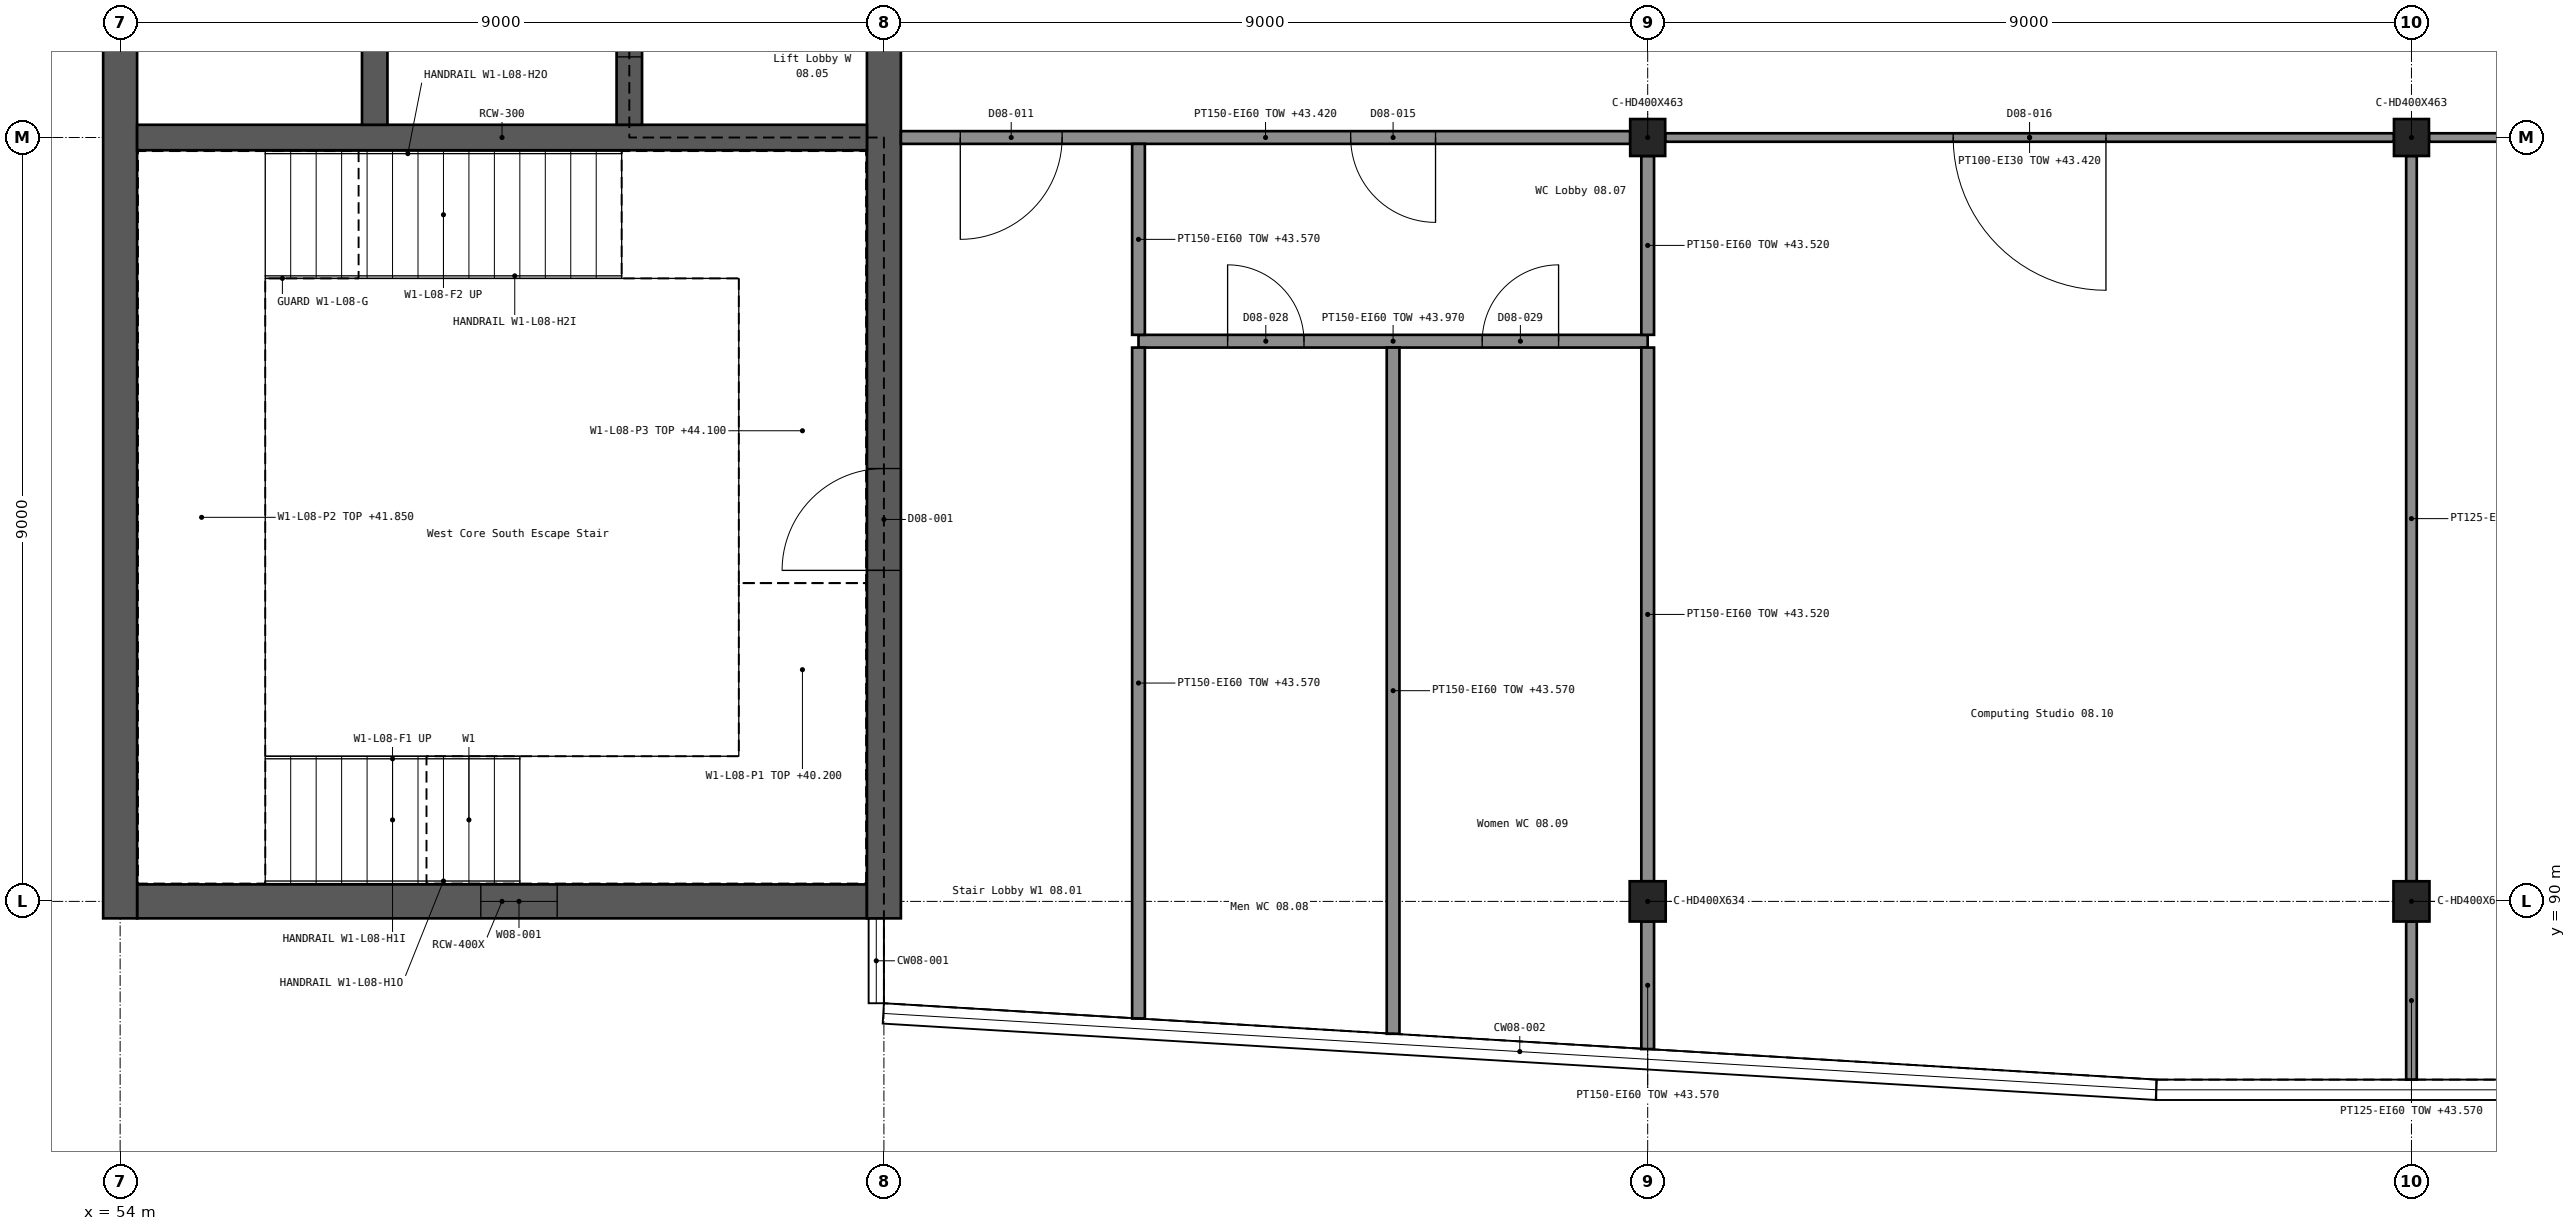
"""IFC4 building model, lengths in metres.
Left out: names, types, materials, properties, quantities, classifications, styles, units other than length and angle.
Written with IfcOpenShell. Run it as: python <this file> out.ifc"""

import sys

from ifc_helpers import new_model, si_unit, direction, frame, frame_2d, origin, origin_2d, place, context, subcontext, project, spatial, rectangle, i_section, extrude, element, fill, save


model = new_model("IFC4")
c1 = context("Model", 3, precision=1e-05, world=origin(), true_north=direction((0.0, 1.0)))
c2 = subcontext(c1, "Body", "Model", "MODEL_VIEW")
j1 = project(units=[si_unit("LENGTHUNIT", "METRE"), si_unit("PLANEANGLEUNIT", "RADIAN")], contexts=[c1])
p1 = place(None, origin())
s1 = spatial("IfcSite", under=j1, at=p1, CompositionType="ELEMENT")
p2 = place(p1, origin())
s2 = spatial("IfcBuilding", under=s1, at=p2, CompositionType="ELEMENT")
p3 = place(p2, frame((0.0, 0.0, 40.2)))
s3 = spatial("IfcBuildingStorey", under=s2, at=p3, CompositionType="ELEMENT", Elevation=40.2)
p4 = place(p3, frame((54.2, 90.0, 0.0), z_axis=(0.0, 0.0, 1.0), x_axis=(1.0, 0.0, 0.0)))
e1 = element("IfcWall", 1, at=p4, inside=s3, PredefinedType="SHEAR", context=c2, shape_type="SweptSolid", body=[
    extrude(rectangle(XDim=8.6, YDim=0.4, at=frame_2d((4.3, 0.0))), origin(), (0.0, 0.0, 1.0), 3.9),
])
p5 = place(p4, frame((4.05, 0.0, 1.2)))
e2 = element("IfcOpeningElement", 2, at=p5, cuts=e1, PredefinedType="OPENING", context=c2, shape_type="SweptSolid", body=[
    extrude(rectangle(XDim=0.9, YDim=1.5, at=frame_2d((0.45, 0.75))), frame((0.0, 0.211, 0.0), z_axis=(0.0, -1.0, 0.0), x_axis=(1.0, 0.0, 0.0)), (0.0, 0.0, 1.0), 0.422),
])
p6 = place(p3, frame((54.0, 89.8, 0.0), z_axis=(0.0, 0.0, 1.0), x_axis=(0.0, 1.0, 0.0)))
e3 = element("IfcWall", 3, at=p6, inside=s3, PredefinedType="SHEAR", context=c2, shape_type="SweptSolid", body=[
    extrude(rectangle(XDim=27.4, YDim=0.4, at=frame_2d((13.7, 0.0))), origin(), (0.0, 0.0, 1.0), 3.9),
])
p7 = place(p3, frame((63.0, 89.8, 0.0), z_axis=(0.0, 0.0, 1.0), x_axis=(0.0, 1.0, 0.0)))
e4 = element("IfcWall", 4, at=p7, inside=s3, PredefinedType="SHEAR", context=c2, shape_type="SweptSolid", body=[
    extrude(rectangle(XDim=27.4, YDim=0.4, at=frame_2d((13.7, 0.0))), origin(), (0.0, 0.0, 1.0), 3.9),
])
p8 = place(p7, frame((4.1, 0.0, 0.0)))
e5 = element("IfcOpeningElement", 5, at=p8, cuts=e4, PredefinedType="OPENING", context=c2, shape_type="SweptSolid", body=[
    extrude(rectangle(XDim=1.2, YDim=2.1, at=frame_2d((0.6, 1.05))), frame((0.0, 0.211, 0.0), z_axis=(0.0, -1.0, 0.0), x_axis=(1.0, 0.0, 0.0)), (0.0, 0.0, 1.0), 0.422),
])
p9 = place(p7, frame((22.1, 0.0, 0.0)))
e6 = element("IfcOpeningElement", 6, at=p9, cuts=e4, PredefinedType="OPENING", context=c2, shape_type="SweptSolid", body=[
    extrude(rectangle(XDim=1.2, YDim=2.1, at=frame_2d((0.6, 1.05))), frame((0.0, 0.211, 0.0), z_axis=(0.0, -1.0, 0.0), x_axis=(1.0, 0.0, 0.0)), (0.0, 0.0, 1.0), 0.422),
])
p10 = place(p7, frame((12.5, 0.0, 0.0)))
e7 = element("IfcOpeningElement", 7, at=p10, cuts=e4, PredefinedType="OPENING", context=c2, shape_type="SweptSolid", body=[
    extrude(rectangle(XDim=2.0, YDim=2.1, at=frame_2d((1.0, 1.05))), frame((0.0, 0.211, 0.0), z_axis=(0.0, -1.0, 0.0), x_axis=(1.0, 0.0, 0.0)), (0.0, 0.0, 1.0), 0.422),
])
p11 = place(p3, frame((54.2, 99.0, 0.0), z_axis=(0.0, 0.0, 1.0), x_axis=(1.0, 0.0, 0.0)))
e8 = element("IfcWall", 8, at=p11, inside=s3, PredefinedType="SHEAR", context=c2, shape_type="SweptSolid", body=[
    extrude(rectangle(XDim=8.6, YDim=0.3, at=frame_2d((4.3, 0.0))), origin(), (0.0, 0.0, 1.0), 3.9),
])
p12 = place(p3, frame((57.0, 99.15, 0.0), z_axis=(0.0, 0.0, 1.0), x_axis=(0.0, 1.0, 0.0)))
e9 = element("IfcWall", 9, at=p12, inside=s3, PredefinedType="SHEAR", context=c2, shape_type="SweptSolid", body=[
    extrude(rectangle(XDim=8.7, YDim=0.3, at=frame_2d((4.35, 0.0))), origin(), (0.0, 0.0, 1.0), 3.9),
])
p13 = place(p3, frame((60.0, 99.15, 0.0), z_axis=(0.0, 0.0, 1.0), x_axis=(0.0, 1.0, 0.0)))
e10 = element("IfcWall", 10, at=p13, inside=s3, PredefinedType="SHEAR", context=c2, shape_type="SweptSolid", body=[
    extrude(rectangle(XDim=8.7, YDim=0.3, at=frame_2d((4.35, 0.0))), origin(), (0.0, 0.0, 1.0), 3.9),
])
p14 = place(p13, frame((0.8, 0.0, 0.0)))
e11 = element("IfcOpeningElement", 11, at=p14, cuts=e10, PredefinedType="OPENING", context=c2, shape_type="SweptSolid", body=[
    extrude(rectangle(XDim=1.1, YDim=2.1, at=frame_2d((0.55, 1.05))), frame((0.0, 0.161, 0.0), z_axis=(0.0, -1.0, 0.0), x_axis=(1.0, 0.0, 0.0)), (0.0, 0.0, 1.0), 0.322),
])
p15 = place(p13, frame((3.8, 0.0, 0.0)))
e12 = element("IfcOpeningElement", 12, at=p15, cuts=e10, PredefinedType="OPENING", context=c2, shape_type="SweptSolid", body=[
    extrude(rectangle(XDim=1.1, YDim=2.1, at=frame_2d((0.55, 1.05))), frame((0.0, 0.161, 0.0), z_axis=(0.0, -1.0, 0.0), x_axis=(1.0, 0.0, 0.0)), (0.0, 0.0, 1.0), 0.322),
])
p16 = place(p13, frame((6.8, 0.0, 0.0)))
e13 = element("IfcOpeningElement", 13, at=p16, cuts=e10, PredefinedType="OPENING", context=c2, shape_type="SweptSolid", body=[
    extrude(rectangle(XDim=1.1, YDim=2.1, at=frame_2d((0.55, 1.05))), frame((0.0, 0.161, 0.0), z_axis=(0.0, -1.0, 0.0), x_axis=(1.0, 0.0, 0.0)), (0.0, 0.0, 1.0), 0.322),
])
for number, where, z_axis, x_axis in (
    (14, (72.0, 90.0, 0.0), (0.0, 0.0, 1.0), (1.0, 0.0, 0.0)),
    (15, (81.0, 90.0, 0.0), (0.0, 0.0, 1.0), (1.0, 0.0, 0.0)),
):
    element("IfcColumn", number, at=place(p3, frame(where, z_axis=z_axis, x_axis=x_axis)), inside=s3, PredefinedType="COLUMN", context=c2, shape_type="SweptSolid", body=[
        extrude(i_section(OverallWidth=0.424, OverallDepth=0.474, WebThickness=0.048, FlangeThickness=0.077, FilletRadius=0.015, at=origin_2d()), origin(), (0.0, 0.0, 1.0), 3.9),
    ])
for number, where, z_axis, x_axis in (
    (16, (72.0, 99.0, 0.0), (0.0, 0.0, 1.0), (1.0, 0.0, 0.0)),
    (17, (81.0, 99.0, 0.0), (0.0, 0.0, 1.0), (1.0, 0.0, 0.0)),
):
    element("IfcColumn", number, at=place(p3, frame(where, z_axis=z_axis, x_axis=x_axis)), inside=s3, PredefinedType="COLUMN", context=c2, shape_type="SweptSolid", body=[
        extrude(i_section(OverallWidth=0.412, OverallDepth=0.435, WebThickness=0.036, FlangeThickness=0.057, FilletRadius=0.015, at=origin_2d()), origin(), (0.0, 0.0, 1.0), 3.9),
    ])
p17 = place(p3, frame((66.0, 96.6, 0.0), z_axis=(0.0, 0.0, 1.0), x_axis=(1.0, 0.0, 0.0)))
e18 = element("IfcWall", 18, at=p17, inside=s3, PredefinedType="PARTITIONING", context=c2, shape_type="SweptSolid", body=[
    extrude(rectangle(XDim=6.0, YDim=0.15, at=frame_2d((3.0, 0.0))), origin(), (0.0, 0.0, 1.0), 3.77),
])
p18 = place(p17, frame((1.05, 0.0, 0.0)))
e19 = element("IfcOpeningElement", 19, at=p18, cuts=e18, PredefinedType="OPENING", context=c2, shape_type="SweptSolid", body=[
    extrude(rectangle(XDim=0.9, YDim=2.1, at=frame_2d((0.45, 1.05))), frame((0.0, 0.086, 0.0), z_axis=(0.0, -1.0, 0.0), x_axis=(1.0, 0.0, 0.0)), (0.0, 0.0, 1.0), 0.172),
])
p19 = place(p17, frame((4.05, 0.0, 0.0)))
e20 = element("IfcOpeningElement", 20, at=p19, cuts=e18, PredefinedType="OPENING", context=c2, shape_type="SweptSolid", body=[
    extrude(rectangle(XDim=0.9, YDim=2.1, at=frame_2d((0.45, 1.05))), frame((0.0, 0.086, 0.0), z_axis=(0.0, -1.0, 0.0), x_axis=(1.0, 0.0, 0.0)), (0.0, 0.0, 1.0), 0.172),
])
p20 = place(p3, frame((72.206, 99.0, 0.0), z_axis=(0.0, 0.0, 1.0), x_axis=(1.0, 0.0, 0.0)))
e21 = element("IfcWall", 21, at=p20, inside=s3, PredefinedType="PARTITIONING", context=c2, shape_type="SweptSolid", body=[
    extrude(rectangle(XDim=8.588, YDim=0.1, at=frame_2d((4.294, 0.0))), origin(), (0.0, 0.0, 1.0), 3.22),
])
p21 = place(p20, frame((3.394, 0.0, 0.0)))
e22 = element("IfcOpeningElement", 22, at=p21, cuts=e21, PredefinedType="OPENING", context=c2, shape_type="SweptSolid", body=[
    extrude(rectangle(XDim=1.8, YDim=2.1, at=frame_2d((0.9, 1.05))), frame((0.0, 0.061, 0.0), z_axis=(0.0, -1.0, 0.0), x_axis=(1.0, 0.0, 0.0)), (0.0, 0.0, 1.0), 0.122),
])
p22 = place(p3, frame((81.206, 99.0, 0.0), z_axis=(0.0, 0.0, 1.0), x_axis=(1.0, 0.0, 0.0)))
e23 = element("IfcWall", 23, at=p22, inside=s3, PredefinedType="PARTITIONING", context=c2, shape_type="SweptSolid", body=[
    extrude(rectangle(XDim=8.588, YDim=0.1, at=frame_2d((4.294, 0.0))), origin(), (0.0, 0.0, 1.0), 3.22),
])
p23 = place(p22, frame((5.769, 0.0, 0.0)))
e24 = element("IfcOpeningElement", 24, at=p23, cuts=e23, PredefinedType="OPENING", context=c2, shape_type="SweptSolid", body=[
    extrude(rectangle(XDim=1.8, YDim=2.1, at=frame_2d((0.9, 1.05))), frame((0.0, 0.061, 0.0), z_axis=(0.0, -1.0, 0.0), x_axis=(1.0, 0.0, 0.0)), (0.0, 0.0, 1.0), 0.122),
])
p24 = place(p3, frame((63.2, 99.0, 0.0), z_axis=(0.0, 0.0, 1.0), x_axis=(1.0, 0.0, 0.0)))
e25 = element("IfcWall", 25, at=p24, inside=s3, PredefinedType="PARTITIONING", context=c2, shape_type="SweptSolid", body=[
    extrude(rectangle(XDim=8.594, YDim=0.15, at=frame_2d((4.297, 0.0))), origin(), (0.0, 0.0, 1.0), 3.22),
])
p25 = place(p24, frame((0.7, 0.0, 0.0)))
e26 = element("IfcOpeningElement", 26, at=p25, cuts=e25, PredefinedType="OPENING", context=c2, shape_type="SweptSolid", body=[
    extrude(rectangle(XDim=1.2, YDim=2.1, at=frame_2d((0.6, 1.05))), frame((0.0, 0.086, 0.0), z_axis=(0.0, -1.0, 0.0), x_axis=(1.0, 0.0, 0.0)), (0.0, 0.0, 1.0), 0.172),
])
p26 = place(p24, frame((5.3, 0.0, 0.0)))
e27 = element("IfcOpeningElement", 27, at=p26, cuts=e25, PredefinedType="OPENING", context=c2, shape_type="SweptSolid", body=[
    extrude(rectangle(XDim=1.0, YDim=2.1, at=frame_2d((0.5, 1.05))), frame((0.0, 0.086, 0.0), z_axis=(0.0, -1.0, 0.0), x_axis=(1.0, 0.0, 0.0)), (0.0, 0.0, 1.0), 0.172),
])
p27 = place(p3, frame((66.0, 88.62, 0.0), z_axis=(0.0, 0.0, 1.0), x_axis=(0.0, 1.0, 0.0)))
e28 = element("IfcWall", 28, at=p27, inside=s3, PredefinedType="PARTITIONING", context=c2, shape_type="SweptSolid", body=[
    extrude(rectangle(XDim=7.905, YDim=0.15, at=frame_2d((3.952, 0.0))), origin(), (0.0, 0.0, 1.0), 3.37),
])
p28 = place(p3, frame((66.0, 96.675, 0.0), z_axis=(0.0, 0.0, 1.0), x_axis=(0.0, 1.0, 0.0)))
e29 = element("IfcWall", 29, at=p28, inside=s3, PredefinedType="PARTITIONING", context=c2, shape_type="SweptSolid", body=[
    extrude(rectangle(XDim=2.25, YDim=0.15, at=frame_2d((1.125, 0.0))), origin(), (0.0, 0.0, 1.0), 3.37),
])
p29 = place(p3, frame((69.0, 88.44, 0.0), z_axis=(0.0, 0.0, 1.0), x_axis=(0.0, 1.0, 0.0)))
e30 = element("IfcWall", 30, at=p29, inside=s3, PredefinedType="PARTITIONING", context=c2, shape_type="SweptSolid", body=[
    extrude(rectangle(XDim=8.085, YDim=0.15, at=frame_2d((4.042, 0.0))), origin(), (0.0, 0.0, 1.0), 3.37),
])
p30 = place(p3, frame((72.0, 88.26, 0.0), z_axis=(0.0, 0.0, 1.0), x_axis=(0.0, 1.0, 0.0)))
e31 = element("IfcWall", 31, at=p30, inside=s3, PredefinedType="PARTITIONING", context=c2, shape_type="SweptSolid", body=[
    extrude(rectangle(XDim=1.503, YDim=0.15, at=frame_2d((0.751, 0.0))), origin(), (0.0, 0.0, 1.0), 3.37),
])
p31 = place(p3, frame((72.0, 90.237, 0.0), z_axis=(0.0, 0.0, 1.0), x_axis=(0.0, 1.0, 0.0)))
e32 = element("IfcWall", 32, at=p31, inside=s3, PredefinedType="PARTITIONING", context=c2, shape_type="SweptSolid", body=[
    extrude(rectangle(XDim=6.288, YDim=0.15, at=frame_2d((3.144, 0.0))), origin(), (0.0, 0.0, 1.0), 3.32),
])
p32 = place(p3, frame((72.0, 96.675, 0.0), z_axis=(0.0, 0.0, 1.0), x_axis=(0.0, 1.0, 0.0)))
e33 = element("IfcWall", 33, at=p32, inside=s3, PredefinedType="PARTITIONING", context=c2, shape_type="SweptSolid", body=[
    extrude(rectangle(XDim=2.107, YDim=0.15, at=frame_2d((1.054, 0.0))), origin(), (0.0, 0.0, 1.0), 3.32),
])
p33 = place(p3, frame((81.0, 87.9, 0.0), z_axis=(0.0, 0.0, 1.0), x_axis=(0.0, 1.0, 0.0)))
e34 = element("IfcWall", 34, at=p33, inside=s3, PredefinedType="PARTITIONING", context=c2, shape_type="SweptSolid", body=[
    extrude(rectangle(XDim=1.863, YDim=0.125, at=frame_2d((0.932, 0.0))), origin(), (0.0, 0.0, 1.0), 3.37),
])
p34 = place(p3, frame((81.0, 90.237, 0.0), z_axis=(0.0, 0.0, 1.0), x_axis=(0.0, 1.0, 0.0)))
e35 = element("IfcWall", 35, at=p34, inside=s3, PredefinedType="PARTITIONING", context=c2, shape_type="SweptSolid", body=[
    extrude(rectangle(XDim=8.545, YDim=0.125, at=frame_2d((4.273, 0.0))), origin(), (0.0, 0.0, 1.0), 3.32),
])
p35 = place(p5, origin())
e36 = element("IfcWindow", 36, at=p35, inside=s3, PartitioningType="SINGLE_PANEL", PredefinedType="WINDOW", context=c2, shape_type="SweptSolid", body=[
    extrude(rectangle(XDim=0.9, YDim=1.5, at=frame_2d((0.45, 0.75))), frame((0.0, 0.03, 0.0), z_axis=(0.0, -1.0, 0.0), x_axis=(1.0, 0.0, 0.0)), (0.0, 0.0, 1.0), 0.06),
])
fill(e2, e36)
p36 = place(p8, origin())
e37 = element("IfcDoor", 37, at=p36, inside=s3, OperationType="SINGLE_SWING_LEFT", PredefinedType="DOOR", context=c2, shape_type="SweptSolid", body=[
    extrude(rectangle(XDim=1.2, YDim=2.1, at=frame_2d((0.6, 1.05))), frame((0.0, 0.025, 0.0), z_axis=(0.0, -1.0, 0.0), x_axis=(1.0, 0.0, 0.0)), (0.0, 0.0, 1.0), 0.05),
])
fill(e5, e37)
p37 = place(p14, origin())
e38 = element("IfcDoor", 38, at=p37, inside=s3, OperationType="DOUBLE_DOOR_SLIDING", PredefinedType="DOOR", context=c2, shape_type="SweptSolid", body=[
    extrude(rectangle(XDim=1.1, YDim=2.1, at=frame_2d((0.55, 1.05))), frame((0.0, 0.025, 0.0), z_axis=(0.0, -1.0, 0.0), x_axis=(1.0, 0.0, 0.0)), (0.0, 0.0, 1.0), 0.05),
])
fill(e11, e38)
p38 = place(p25, frame((1.2, 0.0, 0.0), z_axis=(0.0, 0.0, 1.0), x_axis=(-1.0, 0.0, 0.0)))
e39 = element("IfcDoor", 39, at=p38, inside=s3, OperationType="SINGLE_SWING_RIGHT", PredefinedType="DOOR", context=c2, shape_type="SweptSolid", body=[
    extrude(rectangle(XDim=1.2, YDim=2.1, at=frame_2d((0.6, 1.05))), frame((0.0, 0.025, 0.0), z_axis=(0.0, -1.0, 0.0), x_axis=(1.0, 0.0, 0.0)), (0.0, 0.0, 1.0), 0.05),
])
fill(e26, e39)
p39 = place(p26, frame((1.0, 0.0, 0.0), z_axis=(0.0, 0.0, 1.0), x_axis=(-1.0, 0.0, 0.0)))
e40 = element("IfcDoor", 40, at=p39, inside=s3, OperationType="SINGLE_SWING_LEFT", PredefinedType="DOOR", context=c2, shape_type="SweptSolid", body=[
    extrude(rectangle(XDim=1.0, YDim=2.1, at=frame_2d((0.5, 1.05))), frame((0.0, 0.025, 0.0), z_axis=(0.0, -1.0, 0.0), x_axis=(1.0, 0.0, 0.0)), (0.0, 0.0, 1.0), 0.05),
])
fill(e27, e40)
p40 = place(p21, frame((1.8, 0.0, 0.0), z_axis=(0.0, 0.0, 1.0), x_axis=(-1.0, 0.0, 0.0)))
e41 = element("IfcDoor", 41, at=p40, inside=s3, OperationType="DOUBLE_DOOR_SINGLE_SWING", PredefinedType="DOOR", context=c2, shape_type="SweptSolid", body=[
    extrude(rectangle(XDim=1.8, YDim=2.1, at=frame_2d((0.9, 1.05))), frame((0.0, 0.025, 0.0), z_axis=(0.0, -1.0, 0.0), x_axis=(1.0, 0.0, 0.0)), (0.0, 0.0, 1.0), 0.05),
])
fill(e22, e41)
p41 = place(p18, origin())
e42 = element("IfcDoor", 42, at=p41, inside=s3, OperationType="SINGLE_SWING_LEFT", PredefinedType="DOOR", context=c2, shape_type="SweptSolid", body=[
    extrude(rectangle(XDim=0.9, YDim=2.1, at=frame_2d((0.45, 1.05))), frame((0.0, 0.025, 0.0), z_axis=(0.0, -1.0, 0.0), x_axis=(1.0, 0.0, 0.0)), (0.0, 0.0, 1.0), 0.05),
])
fill(e19, e42)
p42 = place(p19, origin())
e43 = element("IfcDoor", 43, at=p42, inside=s3, OperationType="SINGLE_SWING_RIGHT", PredefinedType="DOOR", context=c2, shape_type="SweptSolid", body=[
    extrude(rectangle(XDim=0.9, YDim=2.1, at=frame_2d((0.45, 1.05))), frame((0.0, 0.025, 0.0), z_axis=(0.0, -1.0, 0.0), x_axis=(1.0, 0.0, 0.0)), (0.0, 0.0, 1.0), 0.05),
])
fill(e20, e43)
save(model, sys.argv[1])
